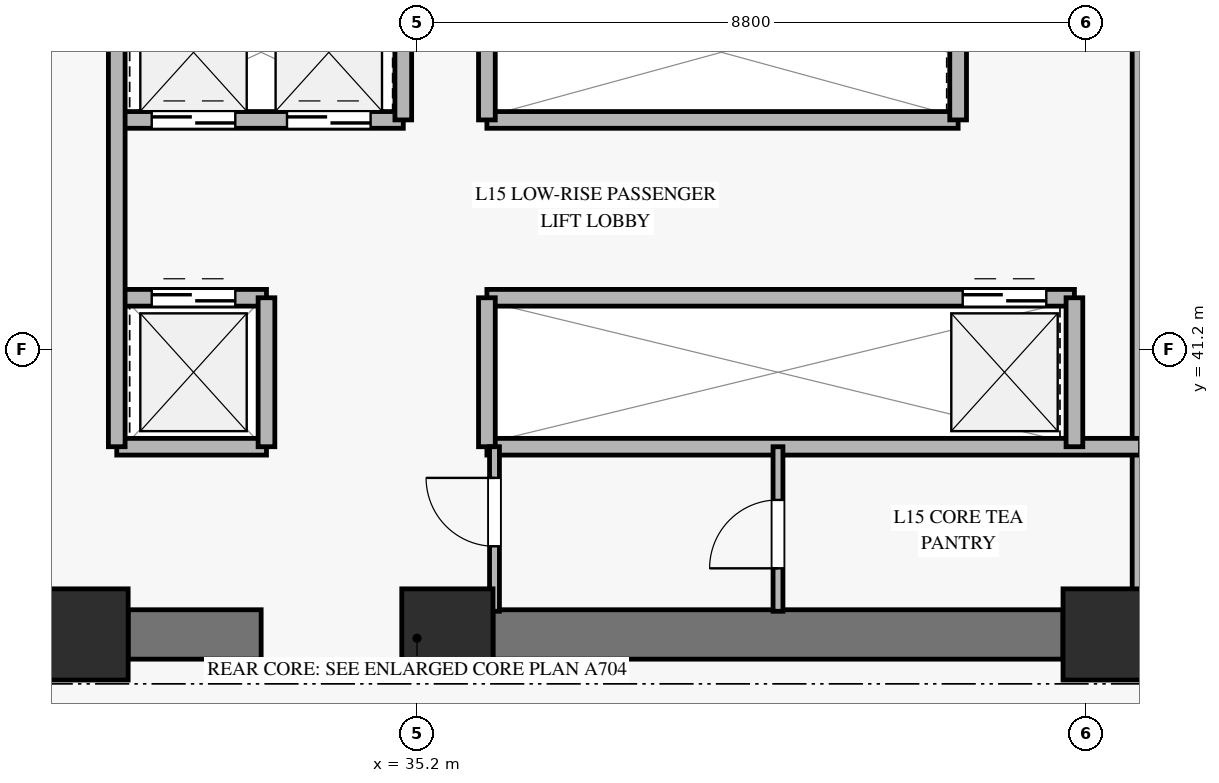
"""IFC4 building model, lengths in metres.
Left out: names, types, materials, properties, quantities, classifications, styles, units other than length and angle.
Written with IfcOpenShell. Run it as: python <this file> out.ifc"""

import sys

from ifc_helpers import new_model, si_unit, direction, frame, frame_2d, origin, origin_2d, place, context, subcontext, project, spatial, rectangle, extrude, source, transform, mapped, element, fill, save


model = new_model("IFC4")
c1 = context("Model", 3, precision=1e-05, world=origin(), true_north=direction((0.0, 1.0)))
c2 = subcontext(c1, "Body", "Model", "MODEL_VIEW")
j1 = project(units=[si_unit("LENGTHUNIT", "METRE"), si_unit("PLANEANGLEUNIT", "RADIAN")], contexts=[c1])
p1 = place(None, origin())
s1 = spatial("IfcSite", under=j1, at=p1, CompositionType="ELEMENT")
p2 = place(p1, origin())
s2 = spatial("IfcBuilding", under=s1, at=p2, CompositionType="ELEMENT")
p3 = place(p2, frame((0.0, 0.0, 61.1)))
s3 = spatial("IfcBuildingStorey", under=s2, at=p3, CompositionType="ELEMENT", Elevation=61.1)
m1 = source(origin(), c2, "Body", "SweptSolid", [
    extrude(rectangle(XDim=1.2, YDim=1.2, at=origin_2d()), origin(), (0.0, 0.0, 1.0), 3.68),
])
for number, where, z_axis, x_axis in (
    (1, (30.8, 37.45, 0.0), (0.0, 0.0, 1.0), (1.0, 0.0, 0.0)),
    (2, (35.6, 37.45, 0.0), (0.0, 0.0, 1.0), (1.0, 0.0, 0.0)),
    (3, (44.3, 37.45, 0.0), (0.0, 0.0, 1.0), (1.0, 0.0, 0.0)),
):
    element("IfcColumn", number, at=place(p3, frame(where, z_axis=z_axis, x_axis=x_axis)), inside=s3, PredefinedType="PILASTER", context=c2, shape_type="MappedRepresentation", body=[
        mapped(m1, transform((0.0, 0.0, 0.0), x_axis=(1.0, 0.0, 0.0), y_axis=(0.0, 1.0, 0.0), z_axis=(0.0, 0.0, 1.0), scale=1.0)),
    ])
p4 = place(p3, frame((31.4, 37.45, 0.0), z_axis=(0.0, 0.0, 1.0), x_axis=(1.0, 0.0, 0.0)))
e4 = element("IfcWall", 4, at=p4, inside=s3, PredefinedType="SHEAR", context=c2, shape_type="SweptSolid", body=[
    extrude(rectangle(XDim=1.75, YDim=0.65, at=frame_2d((0.875, 0.0))), origin(), (0.0, 0.0, 1.0), 3.68),
])
p5 = place(p3, frame((36.2, 37.45, 0.0), z_axis=(0.0, 0.0, 1.0), x_axis=(1.0, 0.0, 0.0)))
e5 = element("IfcWall", 5, at=p5, inside=s3, PredefinedType="SHEAR", context=c2, shape_type="SweptSolid", body=[
    extrude(rectangle(XDim=7.5, YDim=0.65, at=frame_2d((3.75, 0.0))), origin(), (0.0, 0.0, 1.0), 3.68),
])
p6 = place(p3, frame((44.72, 37.755, 0.0), z_axis=(0.0, 0.0, 1.0), x_axis=(0.0, 1.0, 0.0)))
e6 = element("IfcWall", 6, at=p6, inside=s3, PredefinedType="SOLIDWALL", context=c2, shape_type="SweptSolid", body=[
    extrude(rectangle(XDim=7.465, YDim=0.22, at=frame_2d((3.732, 0.0))), origin(), (0.0, 0.0, 1.0), 3.68),
])
p7 = place(p3, frame((31.25, 44.22, 0.0), z_axis=(0.0, 0.0, 1.0), x_axis=(1.0, 0.0, 0.0)))
e7 = element("IfcWall", 7, at=p7, inside=s3, PredefinedType="SOLIDWALL", context=c2, shape_type="SweptSolid", body=[
    extrude(rectangle(XDim=3.77, YDim=0.22, at=frame_2d((1.885, 0.0))), origin(), (0.0, 0.0, 1.0), 3.68),
])
p8 = place(p7, frame((0.46, 0.0, 0.0)))
e8 = element("IfcOpeningElement", 8, at=p8, cuts=e7, PredefinedType="OPENING", context=c2, shape_type="SweptSolid", body=[
    extrude(rectangle(XDim=1.1, YDim=2.2, at=frame_2d((0.55, 1.1))), frame((0.0, 0.12, 0.0), z_axis=(0.0, -1.0, 0.0), x_axis=(1.0, 0.0, 0.0)), (0.0, 0.0, 1.0), 0.24),
])
p9 = place(p7, frame((2.24, 0.0, 0.0)))
e9 = element("IfcOpeningElement", 9, at=p9, cuts=e7, PredefinedType="OPENING", context=c2, shape_type="SweptSolid", body=[
    extrude(rectangle(XDim=1.1, YDim=2.2, at=frame_2d((0.55, 1.1))), frame((0.0, 0.12, 0.0), z_axis=(0.0, -1.0, 0.0), x_axis=(1.0, 0.0, 0.0)), (0.0, 0.0, 1.0), 0.24),
])
p10 = place(p3, frame((36.12, 44.22, 0.0), z_axis=(0.0, 0.0, 1.0), x_axis=(1.0, 0.0, 0.0)))
e10 = element("IfcWall", 10, at=p10, inside=s3, PredefinedType="SOLIDWALL", context=c2, shape_type="SweptSolid", body=[
    extrude(rectangle(XDim=6.2, YDim=0.22, at=frame_2d((3.1, 0.0))), origin(), (0.0, 0.0, 1.0), 3.68),
])
for number, where, z_axis, x_axis in (
    (11, (35.02, 44.22, 0.0), (0.0, 0.0, 1.0), (0.0, 1.0, 0.0)),
    (12, (36.12, 44.22, 0.0), (0.0, 0.0, 1.0), (0.0, 1.0, 0.0)),
    (13, (42.32, 44.22, 0.0), (0.0, 0.0, 1.0), (0.0, 1.0, 0.0)),
):
    element("IfcWall", number, at=place(p3, frame(where, z_axis=z_axis, x_axis=x_axis)), inside=s3, PredefinedType="SOLIDWALL", context=c2, shape_type="SweptSolid", body=[
        extrude(rectangle(XDim=2.025, YDim=0.22, at=frame_2d((1.013, 0.0))), origin(), (0.0, 0.0, 1.0), 3.68),
    ])
p11 = place(p3, frame((31.25, 41.88, 0.0), z_axis=(0.0, 0.0, 1.0), x_axis=(1.0, 0.0, 0.0)))
e14 = element("IfcWall", 14, at=p11, inside=s3, PredefinedType="SOLIDWALL", context=c2, shape_type="SweptSolid", body=[
    extrude(rectangle(XDim=1.97, YDim=0.22, at=frame_2d((0.985, 0.0))), origin(), (0.0, 0.0, 1.0), 3.68),
])
p12 = place(p11, frame((0.46, 0.0, 0.0)))
e15 = element("IfcOpeningElement", 15, at=p12, cuts=e14, PredefinedType="OPENING", context=c2, shape_type="SweptSolid", body=[
    extrude(rectangle(XDim=1.1, YDim=2.2, at=frame_2d((0.55, 1.1))), frame((0.0, 0.12, 0.0), z_axis=(0.0, -1.0, 0.0), x_axis=(1.0, 0.0, 0.0)), (0.0, 0.0, 1.0), 0.24),
])
p13 = place(p3, frame((36.12, 41.88, 0.0), z_axis=(0.0, 0.0, 1.0), x_axis=(1.0, 0.0, 0.0)))
e16 = element("IfcWall", 16, at=p13, inside=s3, PredefinedType="SOLIDWALL", context=c2, shape_type="SweptSolid", body=[
    extrude(rectangle(XDim=7.73, YDim=0.22, at=frame_2d((3.865, 0.0))), origin(), (0.0, 0.0, 1.0), 3.68),
])
p14 = place(p13, frame((6.26, 0.0, 0.0)))
e17 = element("IfcOpeningElement", 17, at=p14, cuts=e16, PredefinedType="OPENING", context=c2, shape_type="SweptSolid", body=[
    extrude(rectangle(XDim=1.1, YDim=2.2, at=frame_2d((0.55, 1.1))), frame((0.0, 0.12, 0.0), z_axis=(0.0, -1.0, 0.0), x_axis=(1.0, 0.0, 0.0)), (0.0, 0.0, 1.0), 0.24),
])
p15 = place(p3, frame((31.25, 39.92, 0.0), z_axis=(0.0, 0.0, 1.0), x_axis=(1.0, 0.0, 0.0)))
e18 = element("IfcWall", 18, at=p15, inside=s3, PredefinedType="SOLIDWALL", context=c2, shape_type="SweptSolid", body=[
    extrude(rectangle(XDim=1.97, YDim=0.22, at=frame_2d((0.985, 0.0))), origin(), (0.0, 0.0, 1.0), 3.68),
])
p16 = place(p3, frame((33.22, 39.92, 0.0), z_axis=(0.0, 0.0, 1.0), x_axis=(0.0, 1.0, 0.0)))
e19 = element("IfcWall", 19, at=p16, inside=s3, PredefinedType="SOLIDWALL", context=c2, shape_type="SweptSolid", body=[
    extrude(rectangle(XDim=1.96, YDim=0.22, at=frame_2d((0.98, 0.0))), origin(), (0.0, 0.0, 1.0), 3.68),
])
p17 = place(p3, frame((36.12, 39.92, 0.0), z_axis=(0.0, 0.0, 1.0), x_axis=(1.0, 0.0, 0.0)))
e20 = element("IfcWall", 20, at=p17, inside=s3, PredefinedType="SOLIDWALL", context=c2, shape_type="SweptSolid", body=[
    extrude(rectangle(XDim=8.6, YDim=0.22, at=frame_2d((4.3, 0.0))), origin(), (0.0, 0.0, 1.0), 2.965),
])
p18 = place(p3, frame((36.12, 39.92, 0.0), z_axis=(0.0, 0.0, 1.0), x_axis=(0.0, 1.0, 0.0)))
e21 = element("IfcWall", 21, at=p18, inside=s3, PredefinedType="SOLIDWALL", context=c2, shape_type="SweptSolid", body=[
    extrude(rectangle(XDim=1.96, YDim=0.22, at=frame_2d((0.98, 0.0))), origin(), (0.0, 0.0, 1.0), 3.68),
])
p19 = place(p3, frame((31.25, 39.92, 0.0), z_axis=(0.0, 0.0, 1.0), x_axis=(0.0, 1.0, 0.0)))
e22 = element("IfcWall", 22, at=p19, inside=s3, PredefinedType="SOLIDWALL", context=c2, shape_type="SweptSolid", body=[
    extrude(rectangle(XDim=6.325, YDim=0.22, at=frame_2d((3.163, 0.0))), origin(), (0.0, 0.0, 1.0), 3.68),
])
p20 = place(p3, frame((43.85, 39.92, 0.0), z_axis=(0.0, 0.0, 1.0), x_axis=(0.0, 1.0, 0.0)))
e23 = element("IfcWall", 23, at=p20, inside=s3, PredefinedType="SOLIDWALL", context=c2, shape_type="SweptSolid", body=[
    extrude(rectangle(XDim=1.96, YDim=0.22, at=frame_2d((0.98, 0.0))), origin(), (0.0, 0.0, 1.0), 3.68),
])
p21 = place(p3, frame((36.22, 37.755, 0.0), z_axis=(0.0, 0.0, 1.0), x_axis=(0.0, 1.0, 0.0)))
e24 = element("IfcWall", 24, at=p21, inside=s3, PredefinedType="PARTITIONING", context=c2, shape_type="SweptSolid", body=[
    extrude(rectangle(XDim=2.165, YDim=0.13, at=frame_2d((1.083, 0.0))), origin(), (0.0, 0.0, 1.0), 3.68),
])
p22 = place(p21, frame((0.855, 0.0, 0.0)))
e25 = element("IfcOpeningElement", 25, at=p22, cuts=e24, PredefinedType="OPENING", context=c2, shape_type="SweptSolid", body=[
    extrude(rectangle(XDim=0.9, YDim=2.1, at=frame_2d((0.45, 1.05))), frame((0.0, 0.075, 0.0), z_axis=(0.0, -1.0, 0.0), x_axis=(1.0, 0.0, 0.0)), (0.0, 0.0, 1.0), 0.15),
])
p23 = place(p3, frame((39.95, 37.755, 0.0), z_axis=(0.0, 0.0, 1.0), x_axis=(0.0, 1.0, 0.0)))
e26 = element("IfcWall", 26, at=p23, inside=s3, PredefinedType="PARTITIONING", context=c2, shape_type="SweptSolid", body=[
    extrude(rectangle(XDim=2.165, YDim=0.13, at=frame_2d((1.083, 0.0))), origin(), (0.0, 0.0, 1.0), 3.68),
])
p24 = place(p23, frame((0.565, 0.0, 0.0)))
e27 = element("IfcOpeningElement", 27, at=p24, cuts=e26, PredefinedType="OPENING", context=c2, shape_type="SweptSolid", body=[
    extrude(rectangle(XDim=0.9, YDim=2.1, at=frame_2d((0.45, 1.05))), frame((0.0, 0.075, 0.0), z_axis=(0.0, -1.0, 0.0), x_axis=(1.0, 0.0, 0.0)), (0.0, 0.0, 1.0), 0.15),
])
m2 = source(origin(), c2, "Body", "SweptSolid", [
    extrude(rectangle(XDim=1.1, YDim=2.2, at=frame_2d((0.55, 1.1))), frame((0.0, 0.025, 0.0), z_axis=(0.0, -1.0, 0.0), x_axis=(1.0, 0.0, 0.0)), (0.0, 0.0, 1.0), 0.05),
])
p25 = place(p8, origin())
e28 = element("IfcDoor", 28, at=p25, inside=s3, OperationType="SLIDING_TO_LEFT", PredefinedType="DOOR", context=c2, shape_type="MappedRepresentation", body=[
    mapped(m2, transform((0.0, 0.0, 0.0), x_axis=(1.0, 0.0, 0.0), y_axis=(0.0, 1.0, 0.0), z_axis=(0.0, 0.0, 1.0), scale=1.0)),
])
fill(e8, e28)
p26 = place(p9, origin())
e29 = element("IfcDoor", 29, at=p26, inside=s3, OperationType="SLIDING_TO_LEFT", PredefinedType="DOOR", context=c2, shape_type="MappedRepresentation", body=[
    mapped(m2, transform((0.0, 0.0, 0.0), x_axis=(1.0, 0.0, 0.0), y_axis=(0.0, 1.0, 0.0), z_axis=(0.0, 0.0, 1.0), scale=1.0)),
])
fill(e9, e29)
p27 = place(p12, origin())
e30 = element("IfcDoor", 30, at=p27, inside=s3, OperationType="SLIDING_TO_LEFT", PredefinedType="DOOR", context=c2, shape_type="MappedRepresentation", body=[
    mapped(m2, transform((0.0, 0.0, 0.0), x_axis=(1.0, 0.0, 0.0), y_axis=(0.0, 1.0, 0.0), z_axis=(0.0, 0.0, 1.0), scale=1.0)),
])
fill(e15, e30)
p28 = place(p14, origin())
e31 = element("IfcDoor", 31, at=p28, inside=s3, OperationType="SLIDING_TO_LEFT", PredefinedType="DOOR", context=c2, shape_type="MappedRepresentation", body=[
    mapped(m2, transform((0.0, 0.0, 0.0), x_axis=(1.0, 0.0, 0.0), y_axis=(0.0, 1.0, 0.0), z_axis=(0.0, 0.0, 1.0), scale=1.0)),
])
fill(e17, e31)
m3 = source(origin(), c2, "Body", "SweptSolid", [
    extrude(rectangle(XDim=0.9, YDim=2.1, at=frame_2d((0.45, 1.05))), frame((0.0, 0.025, 0.0), z_axis=(0.0, -1.0, 0.0), x_axis=(1.0, 0.0, 0.0)), (0.0, 0.0, 1.0), 0.05),
])
p29 = place(p22, origin())
e32 = element("IfcDoor", 32, at=p29, inside=s3, OperationType="SINGLE_SWING_RIGHT", PredefinedType="DOOR", context=c2, shape_type="MappedRepresentation", body=[
    mapped(m3, transform((0.0, 0.0, 0.0), x_axis=(1.0, 0.0, 0.0), y_axis=(0.0, 1.0, 0.0), z_axis=(0.0, 0.0, 1.0), scale=1.0)),
])
fill(e25, e32)
p30 = place(p24, origin())
e33 = element("IfcDoor", 33, at=p30, inside=s3, OperationType="SINGLE_SWING_LEFT", PredefinedType="DOOR", context=c2, shape_type="MappedRepresentation", body=[
    mapped(m3, transform((0.0, 0.0, 0.0), x_axis=(1.0, 0.0, 0.0), y_axis=(0.0, 1.0, 0.0), z_axis=(0.0, 0.0, 1.0), scale=1.0)),
])
fill(e27, e33)
save(model, sys.argv[1])
